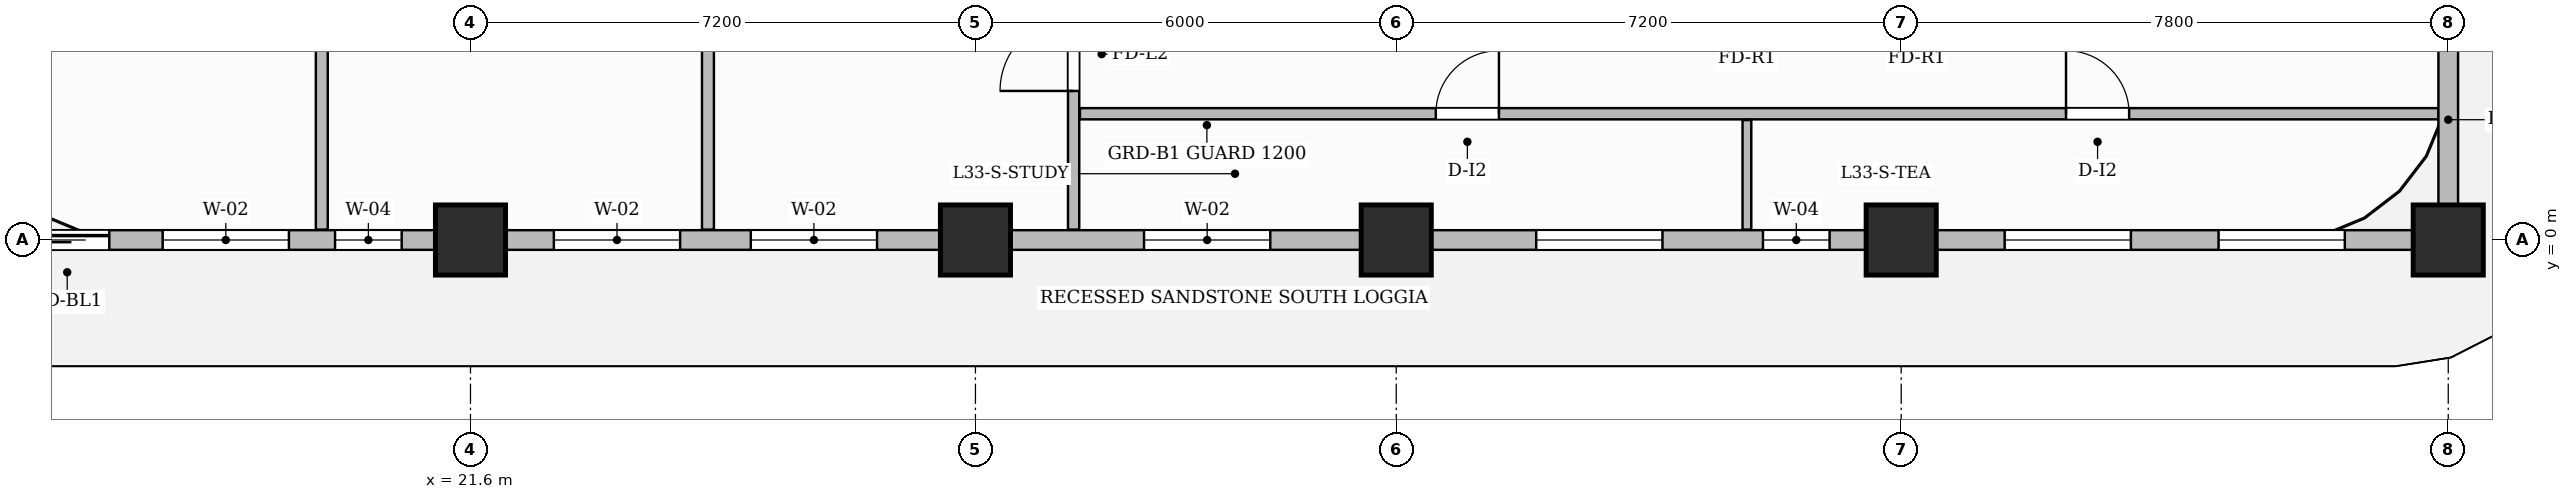
"""IFC4 building model, lengths in metres.
Left out: names, types, materials, properties, quantities, classifications, styles, units other than length and angle.
Written with IfcOpenShell. Run it as: python <this file> out.ifc"""

import sys

from ifc_helpers import new_model, si_unit, direction, frame, frame_2d, origin, origin_2d, place, context, subcontext, project, spatial, rectangle, extrude, source, transform, mapped, element, fill, save


model = new_model("IFC4")
c1 = context("Model", 3, precision=1e-05, world=origin(), true_north=direction((0.0, 1.0)))
c2 = subcontext(c1, "Body", "Model", "MODEL_VIEW")
j1 = project(units=[si_unit("LENGTHUNIT", "METRE"), si_unit("PLANEANGLEUNIT", "RADIAN")], contexts=[c1])
p1 = place(None, origin())
s1 = spatial("IfcSite", under=j1, at=p1, CompositionType="ELEMENT")
p2 = place(p1, origin())
s2 = spatial("IfcBuilding", under=s1, at=p2, CompositionType="ELEMENT")
p3 = place(p2, frame((0.0, 0.0, 134.0)))
s3 = spatial("IfcBuildingStorey", under=s2, at=p3, CompositionType="ELEMENT", Elevation=134.0)
m1 = source(origin(), c2, "Body", "SweptSolid", [
    extrude(rectangle(XDim=1.0, YDim=1.0, at=origin_2d()), origin(), (0.0, 0.0, 1.0), 3.7),
])
for number, where, z_axis, x_axis in (
    (1, (21.6, 0.0, 0.0), (0.0, 0.0, 1.0), (1.0, 0.0, 0.0)),
    (2, (28.8, 0.0, 0.0), (0.0, 0.0, 1.0), (1.0, 0.0, 0.0)),
    (3, (34.8, 0.0, 0.0), (0.0, 0.0, 1.0), (1.0, 0.0, 0.0)),
    (4, (42.0, 0.0, 0.0), (0.0, 0.0, 1.0), (1.0, 0.0, 0.0)),
    (5, (49.8, 0.0, 0.0), (0.0, 0.0, 1.0), (1.0, 0.0, 0.0)),
):
    element("IfcColumn", number, at=place(p3, frame(where, z_axis=z_axis, x_axis=x_axis)), inside=s3, PredefinedType="COLUMN", context=c2, shape_type="MappedRepresentation", body=[
        mapped(m1, transform((0.0, 0.0, 0.0), scale=1.0)),
    ])
p4 = place(p3, frame((30.2, 0.148, 0.0), z_axis=(0.0, 0.0, 1.0), x_axis=(0.0, 1.0, 0.0)))
e6 = element("IfcWall", 6, at=p4, inside=s3, PredefinedType="PARTITIONING", context=c2, shape_type="SweptSolid", body=[
    extrude(rectangle(XDim=9.312, YDim=0.16, at=frame_2d((4.656, 0.0))), origin(), (0.0, 0.0, 1.0), 3.45),
])
p5 = place(p4, frame((1.977, 0.0, 0.0)))
e7 = element("IfcOpeningElement", 7, at=p5, cuts=e6, PredefinedType="OPENING", context=c2, shape_type="SweptSolid", body=[
    extrude(rectangle(XDim=1.05, YDim=2.15, at=frame_2d((0.525, 1.075))), frame((0.0, 0.09, 0.0), z_axis=(0.0, -1.0, 0.0), x_axis=(1.0, 0.0, 0.0)), (0.0, 0.0, 1.0), 0.18),
])
p6 = place(p3, frame((30.29, 1.8, 0.0), z_axis=(0.0, 0.0, 1.0), x_axis=(1.0, 0.0, 0.0)))
e8 = element("IfcWall", 8, at=p6, inside=s3, PredefinedType="PARTITIONING", context=c2, shape_type="SweptSolid", body=[
    extrude(rectangle(XDim=19.37, YDim=0.16, at=frame_2d((9.685, 0.0))), origin(), (0.0, 0.0, 1.0), 3.45),
])
p7 = place(p6, frame((5.074, 0.0, 0.0)))
e9 = element("IfcOpeningElement", 9, at=p7, cuts=e8, PredefinedType="OPENING", context=c2, shape_type="SweptSolid", body=[
    extrude(rectangle(XDim=0.9, YDim=2.15, at=frame_2d((0.45, 1.075))), frame((0.0, 0.09, 0.0), z_axis=(0.0, -1.0, 0.0), x_axis=(1.0, 0.0, 0.0)), (0.0, 0.0, 1.0), 0.18),
])
p8 = place(p6, frame((14.06, 0.0, 0.0)))
e10 = element("IfcOpeningElement", 10, at=p8, cuts=e8, PredefinedType="OPENING", context=c2, shape_type="SweptSolid", body=[
    extrude(rectangle(XDim=0.9, YDim=2.15, at=frame_2d((0.45, 1.075))), frame((0.0, 0.09, 0.0), z_axis=(0.0, -1.0, 0.0), x_axis=(1.0, 0.0, 0.0)), (0.0, 0.0, 1.0), 0.18),
])
p9 = place(p3, frame((39.8, 0.148, 0.0), z_axis=(0.0, 0.0, 1.0), x_axis=(0.0, 1.0, 0.0)))
e11 = element("IfcWall", 11, at=p9, inside=s3, PredefinedType="PARTITIONING", context=c2, shape_type="SweptSolid", body=[
    extrude(rectangle(XDim=1.562, YDim=0.125, at=frame_2d((0.781, 0.0))), origin(), (0.0, 0.0, 1.0), 3.45),
])
p10 = place(p3, frame((19.48, 0.148, 0.0), z_axis=(0.0, 0.0, 1.0), x_axis=(0.0, 1.0, 0.0)))
e12 = element("IfcWall", 12, at=p10, inside=s3, PredefinedType="PARTITIONING", context=c2, shape_type="SweptSolid", body=[
    extrude(rectangle(XDim=9.312, YDim=0.17, at=frame_2d((4.656, 0.0))), origin(), (0.0, 0.0, 1.0), 3.45),
])
p11 = place(p3, frame((24.986, 0.148, 0.0), z_axis=(0.0, 0.0, 1.0), x_axis=(0.0, 1.0, 0.0)))
e13 = element("IfcWall", 13, at=p11, inside=s3, PredefinedType="PARTITIONING", context=c2, shape_type="SweptSolid", body=[
    extrude(rectangle(XDim=9.312, YDim=0.17, at=frame_2d((4.656, 0.0))), origin(), (0.0, 0.0, 1.0), 3.105),
])
p12 = place(p3, frame((14.4, 0.0, 0.0), z_axis=(0.0, 0.0, 1.0), x_axis=(1.0, 0.0, 0.0)))
e14 = element("IfcWall", 14, at=p12, inside=s3, PredefinedType="SOLIDWALL", context=c2, shape_type="SweptSolid", body=[
    extrude(rectangle(XDim=35.4, YDim=0.28, at=frame_2d((17.7, 0.0))), origin(), (0.0, 0.0, 1.0), 2.935),
])
p13 = place(p12, frame((0.85, 0.0, 0.0)))
e15 = element("IfcOpeningElement", 15, at=p13, cuts=e14, PredefinedType="OPENING", context=c2, shape_type="SweptSolid", body=[
    extrude(rectangle(XDim=1.2, YDim=2.2, at=frame_2d((0.6, 1.1))), frame((0.0, 0.15, 0.0), z_axis=(0.0, -1.0, 0.0), x_axis=(1.0, 0.0, 0.0)), (0.0, 0.0, 1.0), 0.3),
])
p14 = place(p12, frame((2.811, 0.0, 0.8)))
e16 = element("IfcOpeningElement", 16, at=p14, cuts=e14, PredefinedType="OPENING", context=c2, shape_type="SweptSolid", body=[
    extrude(rectangle(XDim=1.8, YDim=1.85, at=frame_2d((0.9, 0.925))), frame((0.0, 0.15, 0.0), z_axis=(0.0, -1.0, 0.0), x_axis=(1.0, 0.0, 0.0)), (0.0, 0.0, 1.0), 0.3),
])
p15 = place(p12, frame((5.269, 0.0, 0.8)))
e17 = element("IfcOpeningElement", 17, at=p15, cuts=e14, PredefinedType="OPENING", context=c2, shape_type="SweptSolid", body=[
    extrude(rectangle(XDim=0.95, YDim=1.75, at=frame_2d((0.475, 0.875))), frame((0.0, 0.15, 0.0), z_axis=(0.0, -1.0, 0.0), x_axis=(1.0, 0.0, 0.0)), (0.0, 0.0, 1.0), 0.3),
])
p16 = place(p12, frame((8.389, 0.0, 0.8)))
e18 = element("IfcOpeningElement", 18, at=p16, cuts=e14, PredefinedType="OPENING", context=c2, shape_type="SweptSolid", body=[
    extrude(rectangle(XDim=1.8, YDim=1.85, at=frame_2d((0.9, 0.925))), frame((0.0, 0.15, 0.0), z_axis=(0.0, -1.0, 0.0), x_axis=(1.0, 0.0, 0.0)), (0.0, 0.0, 1.0), 0.3),
])
p17 = place(p12, frame((11.197, 0.0, 0.8)))
e19 = element("IfcOpeningElement", 19, at=p17, cuts=e14, PredefinedType="OPENING", context=c2, shape_type="SweptSolid", body=[
    extrude(rectangle(XDim=1.8, YDim=1.85, at=frame_2d((0.9, 0.925))), frame((0.0, 0.15, 0.0), z_axis=(0.0, -1.0, 0.0), x_axis=(1.0, 0.0, 0.0)), (0.0, 0.0, 1.0), 0.3),
])
p18 = place(p12, frame((16.804, 0.0, 0.8)))
e20 = element("IfcOpeningElement", 20, at=p18, cuts=e14, PredefinedType="OPENING", context=c2, shape_type="SweptSolid", body=[
    extrude(rectangle(XDim=1.8, YDim=1.85, at=frame_2d((0.9, 0.925))), frame((0.0, 0.15, 0.0), z_axis=(0.0, -1.0, 0.0), x_axis=(1.0, 0.0, 0.0)), (0.0, 0.0, 1.0), 0.3),
])
p19 = place(p12, frame((22.396, 0.0, 0.8)))
e21 = element("IfcOpeningElement", 21, at=p19, cuts=e14, PredefinedType="OPENING", context=c2, shape_type="SweptSolid", body=[
    extrude(rectangle(XDim=1.8, YDim=1.85, at=frame_2d((0.9, 0.925))), frame((0.0, 0.15, 0.0), z_axis=(0.0, -1.0, 0.0), x_axis=(1.0, 0.0, 0.0)), (0.0, 0.0, 1.0), 0.3),
])
p20 = place(p12, frame((25.629, 0.0, 0.8)))
e22 = element("IfcOpeningElement", 22, at=p20, cuts=e14, PredefinedType="OPENING", context=c2, shape_type="SweptSolid", body=[
    extrude(rectangle(XDim=0.95, YDim=1.75, at=frame_2d((0.475, 0.875))), frame((0.0, 0.15, 0.0), z_axis=(0.0, -1.0, 0.0), x_axis=(1.0, 0.0, 0.0)), (0.0, 0.0, 1.0), 0.3),
])
p21 = place(p12, frame((29.075, 0.0, 0.8)))
e23 = element("IfcOpeningElement", 23, at=p21, cuts=e14, PredefinedType="OPENING", context=c2, shape_type="SweptSolid", body=[
    extrude(rectangle(XDim=1.8, YDim=1.85, at=frame_2d((0.9, 0.925))), frame((0.0, 0.15, 0.0), z_axis=(0.0, -1.0, 0.0), x_axis=(1.0, 0.0, 0.0)), (0.0, 0.0, 1.0), 0.3),
])
p22 = place(p12, frame((32.125, 0.0, 0.8)))
e24 = element("IfcOpeningElement", 24, at=p22, cuts=e14, PredefinedType="OPENING", context=c2, shape_type="SweptSolid", body=[
    extrude(rectangle(XDim=1.8, YDim=1.85, at=frame_2d((0.9, 0.925))), frame((0.0, 0.15, 0.0), z_axis=(0.0, -1.0, 0.0), x_axis=(1.0, 0.0, 0.0)), (0.0, 0.0, 1.0), 0.3),
])
p23 = place(p3, frame((49.8, 0.05, 0.0), z_axis=(0.0, 0.0, 1.0), x_axis=(0.0, 1.0, 0.0)))
e25 = element("IfcWall", 25, at=p23, inside=s3, PredefinedType="SOLIDWALL", context=c2, shape_type="SweptSolid", body=[
    extrude(rectangle(XDim=3.33, YDim=0.28, at=frame_2d((1.665, 0.0))), origin(), (0.0, 0.0, 1.0), 3.45),
])
m2 = source(origin(), c2, "Body", "SweptSolid", [
    extrude(rectangle(XDim=1.05, YDim=2.15, at=frame_2d((0.525, 1.075))), frame((0.0, 0.025, 0.0), z_axis=(0.0, -1.0, 0.0), x_axis=(1.0, 0.0, 0.0)), (0.0, 0.0, 1.0), 0.05),
])
p24 = place(p5, origin())
e26 = element("IfcDoor", 26, at=p24, inside=s3, OperationType="SINGLE_SWING_LEFT", PredefinedType="DOOR", context=c2, shape_type="MappedRepresentation", body=[
    mapped(m2, transform((0.0, 0.0, 0.0), scale=1.0)),
])
fill(e7, e26)
m3 = source(origin(), c2, "Body", "SweptSolid", [
    extrude(rectangle(XDim=0.9, YDim=2.15, at=frame_2d((0.45, 1.075))), frame((0.0, 0.025, 0.0), z_axis=(0.0, -1.0, 0.0), x_axis=(1.0, 0.0, 0.0)), (0.0, 0.0, 1.0), 0.05),
])
p25 = place(p7, origin())
e27 = element("IfcDoor", 27, at=p25, inside=s3, OperationType="SINGLE_SWING_RIGHT", PredefinedType="DOOR", context=c2, shape_type="MappedRepresentation", body=[
    mapped(m3, transform((0.0, 0.0, 0.0), scale=1.0)),
])
fill(e9, e27)
p26 = place(p8, origin())
e28 = element("IfcDoor", 28, at=p26, inside=s3, OperationType="SINGLE_SWING_LEFT", PredefinedType="DOOR", context=c2, shape_type="MappedRepresentation", body=[
    mapped(m3, transform((0.0, 0.0, 0.0), scale=1.0)),
])
fill(e10, e28)
m4 = source(origin(), c2, "Body", "SweptSolid", [
    extrude(rectangle(XDim=1.2, YDim=2.2, at=frame_2d((0.6, 1.1))), frame((0.0, 0.025, 0.0), z_axis=(0.0, -1.0, 0.0), x_axis=(1.0, 0.0, 0.0)), (0.0, 0.0, 1.0), 0.05),
])
p27 = place(p13, origin())
e29 = element("IfcDoor", 29, at=p27, inside=s3, OperationType="SLIDING_TO_LEFT", PredefinedType="DOOR", context=c2, shape_type="MappedRepresentation", body=[
    mapped(m4, transform((0.0, 0.0, 0.0), scale=1.0)),
])
fill(e15, e29)
m5 = source(origin(), c2, "Body", "SweptSolid", [
    extrude(rectangle(XDim=1.8, YDim=1.85, at=frame_2d((0.9, 0.925))), frame((0.0, 0.03, 0.0), z_axis=(0.0, -1.0, 0.0), x_axis=(1.0, 0.0, 0.0)), (0.0, 0.0, 1.0), 0.06),
])
p28 = place(p14, origin())
e30 = element("IfcWindow", 30, at=p28, inside=s3, PartitioningType="DOUBLE_PANEL_VERTICAL", PredefinedType="WINDOW", context=c2, shape_type="MappedRepresentation", body=[
    mapped(m5, transform((0.0, 0.0, 0.0), scale=1.0)),
])
fill(e16, e30)
m6 = source(origin(), c2, "Body", "SweptSolid", [
    extrude(rectangle(XDim=0.95, YDim=1.75, at=frame_2d((0.475, 0.875))), frame((0.0, 0.03, 0.0), z_axis=(0.0, -1.0, 0.0), x_axis=(1.0, 0.0, 0.0)), (0.0, 0.0, 1.0), 0.06),
])
p29 = place(p15, origin())
e31 = element("IfcWindow", 31, at=p29, inside=s3, PartitioningType="SINGLE_PANEL", PredefinedType="WINDOW", context=c2, shape_type="MappedRepresentation", body=[
    mapped(m6, transform((0.0, 0.0, 0.0), scale=1.0)),
])
fill(e17, e31)
p30 = place(p16, origin())
e32 = element("IfcWindow", 32, at=p30, inside=s3, PartitioningType="DOUBLE_PANEL_VERTICAL", PredefinedType="WINDOW", context=c2, shape_type="MappedRepresentation", body=[
    mapped(m5, transform((0.0, 0.0, 0.0), scale=1.0)),
])
fill(e18, e32)
p31 = place(p17, origin())
e33 = element("IfcWindow", 33, at=p31, inside=s3, PartitioningType="DOUBLE_PANEL_VERTICAL", PredefinedType="WINDOW", context=c2, shape_type="MappedRepresentation", body=[
    mapped(m5, transform((0.0, 0.0, 0.0), scale=1.0)),
])
fill(e19, e33)
p32 = place(p18, origin())
e34 = element("IfcWindow", 34, at=p32, inside=s3, PartitioningType="DOUBLE_PANEL_VERTICAL", PredefinedType="WINDOW", context=c2, shape_type="MappedRepresentation", body=[
    mapped(m5, transform((0.0, 0.0, 0.0), scale=1.0)),
])
fill(e20, e34)
p33 = place(p19, origin())
e35 = element("IfcWindow", 35, at=p33, inside=s3, PartitioningType="DOUBLE_PANEL_VERTICAL", PredefinedType="WINDOW", context=c2, shape_type="MappedRepresentation", body=[
    mapped(m5, transform((0.0, 0.0, 0.0), scale=1.0)),
])
fill(e21, e35)
p34 = place(p20, origin())
e36 = element("IfcWindow", 36, at=p34, inside=s3, PartitioningType="SINGLE_PANEL", PredefinedType="WINDOW", context=c2, shape_type="MappedRepresentation", body=[
    mapped(m6, transform((0.0, 0.0, 0.0), scale=1.0)),
])
fill(e22, e36)
p35 = place(p21, origin())
e37 = element("IfcWindow", 37, at=p35, inside=s3, PartitioningType="DOUBLE_PANEL_VERTICAL", PredefinedType="WINDOW", context=c2, shape_type="MappedRepresentation", body=[
    mapped(m5, transform((0.0, 0.0, 0.0), scale=1.0)),
])
fill(e23, e37)
p36 = place(p22, origin())
e38 = element("IfcWindow", 38, at=p36, inside=s3, PartitioningType="DOUBLE_PANEL_VERTICAL", PredefinedType="WINDOW", context=c2, shape_type="MappedRepresentation", body=[
    mapped(m5, transform((0.0, 0.0, 0.0), scale=1.0)),
])
fill(e24, e38)
save(model, sys.argv[1])
